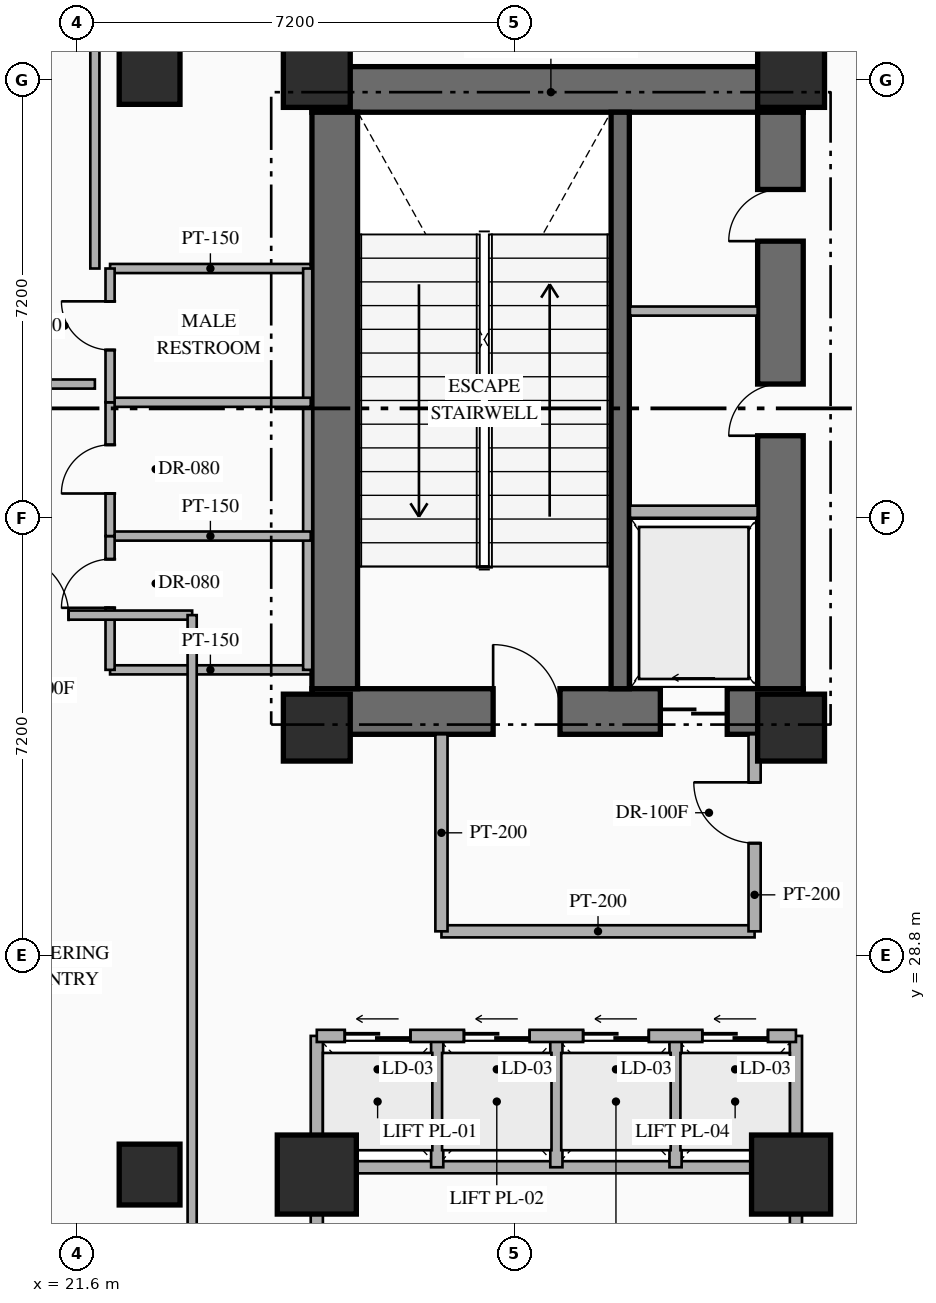
"""IFC4 building model, lengths in metres.
Left out: names, types, materials, properties, quantities, classifications, styles, units other than length and angle.
Written with IfcOpenShell. Run it as: python <this file> out.ifc"""

import sys

from ifc_helpers import new_model, si_unit, direction, frame, frame_2d, origin, origin_2d, place, context, subcontext, project, spatial, rectangle, hollow_rectangle, extrude, element, fill, save


model = new_model("IFC4")
c1 = context("Model", 3, precision=1e-05, world=origin(), true_north=direction((0.0, 1.0)))
c2 = subcontext(c1, "Body", "Model", "MODEL_VIEW")
j1 = project(units=[si_unit("LENGTHUNIT", "METRE"), si_unit("PLANEANGLEUNIT", "RADIAN")], contexts=[c1])
p1 = place(None, origin())
s1 = spatial("IfcSite", under=j1, at=p1, CompositionType="ELEMENT")
p2 = place(p1, origin())
s2 = spatial("IfcBuilding", under=s1, at=p2, CompositionType="ELEMENT")
p3 = place(p2, frame((0.0, 0.0, 21.6)))
s3 = spatial("IfcBuildingStorey", under=s2, at=p3, CompositionType="ELEMENT", Elevation=21.6)
p4 = place(p3, frame((25.47, 32.815, 0.0), z_axis=(0.0, 0.0, 1.0), x_axis=(1.0, 0.0, 0.0)))
e1 = element("IfcWall", 1, at=p4, inside=s3, PredefinedType="SHEAR", context=c2, shape_type="SweptSolid", body=[
    extrude(rectangle(XDim=8.08, YDim=0.75, at=frame_2d((4.04, 0.0))), origin(), (0.0, 0.0, 1.0), 5.4),
])
p5 = place(p4, frame((2.98, 0.0, 0.0)))
e2 = element("IfcOpeningElement", 2, at=p5, cuts=e1, PredefinedType="OPENING", context=c2, shape_type="SweptSolid", body=[
    extrude(rectangle(XDim=1.1, YDim=2.2, at=frame_2d((0.55, 1.1))), frame((0.0, 0.385, 0.0), z_axis=(0.0, -1.0, 0.0), x_axis=(1.0, 0.0, 0.0)), (0.0, 0.0, 1.0), 0.77),
])
p6 = place(p4, frame((5.73, 0.0, 0.0)))
e3 = element("IfcOpeningElement", 3, at=p6, cuts=e1, PredefinedType="OPENING", context=c2, shape_type="SweptSolid", body=[
    extrude(rectangle(XDim=1.1, YDim=2.15, at=frame_2d((0.55, 1.075))), frame((0.0, 0.385, 0.0), z_axis=(0.0, -1.0, 0.0), x_axis=(1.0, 0.0, 0.0)), (0.0, 0.0, 1.0), 0.77),
])
p7 = place(p3, frame((25.47, 43.045, 0.0), z_axis=(0.0, 0.0, 1.0), x_axis=(1.0, 0.0, 0.0)))
e4 = element("IfcWall", 4, at=p7, inside=s3, PredefinedType="SHEAR", context=c2, shape_type="SweptSolid", body=[
    extrude(rectangle(XDim=8.08, YDim=0.75, at=frame_2d((4.04, 0.0))), origin(), (0.0, 0.0, 1.0), 5.4),
])
p8 = place(p3, frame((25.845, 33.19, 0.0), z_axis=(0.0, 0.0, 1.0), x_axis=(0.0, 1.0, 0.0)))
e5 = element("IfcWall", 5, at=p8, inside=s3, PredefinedType="SHEAR", context=c2, shape_type="SweptSolid", body=[
    extrude(rectangle(XDim=9.48, YDim=0.75, at=frame_2d((4.74, 0.0))), origin(), (0.0, 0.0, 1.0), 5.4),
])
p9 = place(p3, frame((33.175, 33.19, 0.0), z_axis=(0.0, 0.0, 1.0), x_axis=(0.0, 1.0, 0.0)))
e6 = element("IfcWall", 6, at=p9, inside=s3, PredefinedType="SHEAR", context=c2, shape_type="SweptSolid", body=[
    extrude(rectangle(XDim=9.48, YDim=0.75, at=frame_2d((4.74, 0.0))), origin(), (0.0, 0.0, 1.0), 5.4),
])
p10 = place(p9, frame((4.16, 0.0, 0.0)))
e7 = element("IfcOpeningElement", 7, at=p10, cuts=e6, PredefinedType="OPENING", context=c2, shape_type="SweptSolid", body=[
    extrude(rectangle(XDim=0.85, YDim=2.08, at=frame_2d((0.425, 1.04))), frame((0.0, 0.385, 0.0), z_axis=(0.0, -1.0, 0.0), x_axis=(1.0, 0.0, 0.0)), (0.0, 0.0, 1.0), 0.77),
])
p11 = place(p9, frame((7.36, 0.0, 0.0)))
e8 = element("IfcOpeningElement", 8, at=p11, cuts=e6, PredefinedType="OPENING", context=c2, shape_type="SweptSolid", body=[
    extrude(rectangle(XDim=0.85, YDim=2.08, at=frame_2d((0.425, 1.04))), frame((0.0, 0.385, 0.0), z_axis=(0.0, -1.0, 0.0), x_axis=(1.0, 0.0, 0.0)), (0.0, 0.0, 1.0), 0.77),
])
p12 = place(p3, frame((30.54, 33.19, 0.0), z_axis=(0.0, 0.0, 1.0), x_axis=(0.0, 1.0, 0.0)))
e9 = element("IfcWall", 9, at=p12, inside=s3, PredefinedType="SHEAR", context=c2, shape_type="SweptSolid", body=[
    extrude(rectangle(XDim=9.48, YDim=0.3, at=frame_2d((4.74, 0.0))), origin(), (0.0, 0.0, 1.0), 5.4),
])
for number, where, z_axis, x_axis in (
    (10, (25.55, 32.55, 0.0), (0.0, 0.0, 1.0), (1.0, 0.0, 0.0)),
    (11, (33.35, 32.55, 0.0), (0.0, 0.0, 1.0), (1.0, 0.0, 0.0)),
    (12, (25.55, 43.3, 0.0), (0.0, 0.0, 1.0), (1.0, 0.0, 0.0)),
    (13, (33.35, 43.3, 0.0), (0.0, 0.0, 1.0), (1.0, 0.0, 0.0)),
):
    element("IfcColumn", number, at=place(p3, frame(where, z_axis=z_axis, x_axis=x_axis)), inside=s3, PredefinedType="COLUMN", context=c2, shape_type="SweptSolid", body=[
        extrude(rectangle(XDim=1.1, YDim=1.1, at=origin_2d()), origin(), (0.0, 0.0, 1.0), 5.4),
    ])
for number, where, z_axis, x_axis in (
    (14, (25.55, 25.2, 0.0), (0.0, 0.0, 1.0), (1.0, 0.0, 0.0)),
    (15, (33.35, 25.2, 0.0), (0.0, 0.0, 1.0), (1.0, 0.0, 0.0)),
):
    element("IfcColumn", number, at=place(p3, frame(where, z_axis=z_axis, x_axis=x_axis)), inside=s3, PredefinedType="COLUMN", context=c2, shape_type="SweptSolid", body=[
        extrude(rectangle(XDim=1.3, YDim=1.3, at=origin_2d()), origin(), (0.0, 0.0, 1.0), 5.4),
    ])
for number, where, z_axis, x_axis in (
    (16, (22.8, 25.2, 0.0), (0.0, 0.0, 1.0), (1.0, 0.0, 0.0)),
    (17, (22.8, 43.3, 0.0), (0.0, 0.0, 1.0), (1.0, 0.0, 0.0)),
):
    element("IfcColumn", number, at=place(p3, frame(where, z_axis=z_axis, x_axis=x_axis)), inside=s3, PredefinedType="COLUMN", context=c2, shape_type="SweptSolid", body=[
        extrude(hollow_rectangle(XDim=1.0, YDim=1.0, WallThickness=0.038, at=origin_2d()), origin(), (0.0, 0.0, 1.0), 5.4),
    ])
p13 = place(p3, frame((30.7, 36.1, 0.0), z_axis=(0.0, 0.0, 1.0), x_axis=(1.0, 0.0, 0.0)))
e18 = element("IfcWall", 18, at=p13, inside=s3, PredefinedType="STANDARD", context=c2, shape_type="SweptSolid", body=[
    extrude(rectangle(XDim=2.1, YDim=0.2, at=frame_2d((1.05, 0.0))), origin(), (0.0, 0.0, 1.0), 5.1),
])
p14 = place(p3, frame((30.7, 39.4, 0.0), z_axis=(0.0, 0.0, 1.0), x_axis=(1.0, 0.0, 0.0)))
e19 = element("IfcWall", 19, at=p14, inside=s3, PredefinedType="PARTITIONING", context=c2, shape_type="SweptSolid", body=[
    extrude(rectangle(XDim=2.1, YDim=0.15, at=frame_2d((1.05, 0.0))), origin(), (0.0, 0.0, 1.0), 5.1),
])
p15 = place(p3, frame((27.6, 29.2, 0.0), z_axis=(0.0, 0.0, 1.0), x_axis=(1.0, 0.0, 0.0)))
e20 = element("IfcWall", 20, at=p15, inside=s3, PredefinedType="STANDARD", context=c2, shape_type="SweptSolid", body=[
    extrude(rectangle(XDim=5.15, YDim=0.2, at=frame_2d((2.575, 0.0))), origin(), (0.0, 0.0, 1.0), 5.1),
])
p16 = place(p3, frame((27.6, 29.2, 0.0), z_axis=(0.0, 0.0, 1.0), x_axis=(0.0, 1.0, 0.0)))
e21 = element("IfcWall", 21, at=p16, inside=s3, PredefinedType="STANDARD", context=c2, shape_type="SweptSolid", body=[
    extrude(rectangle(XDim=3.24, YDim=0.2, at=frame_2d((1.62, 0.0))), origin(), (0.0, 0.0, 1.0), 5.1),
])
p17 = place(p3, frame((32.75, 29.2, 0.0), z_axis=(0.0, 0.0, 1.0), x_axis=(0.0, 1.0, 0.0)))
e22 = element("IfcWall", 22, at=p17, inside=s3, PredefinedType="STANDARD", context=c2, shape_type="SweptSolid", body=[
    extrude(rectangle(XDim=3.24, YDim=0.2, at=frame_2d((1.62, 0.0))), origin(), (0.0, 0.0, 1.0), 5.1),
])
p18 = place(p17, frame((1.45, 0.0, 0.0)))
e23 = element("IfcOpeningElement", 23, at=p18, cuts=e22, PredefinedType="OPENING", context=c2, shape_type="SweptSolid", body=[
    extrude(rectangle(XDim=1.0, YDim=2.2, at=frame_2d((0.5, 1.1))), frame((0.0, 0.11, 0.0), z_axis=(0.0, -1.0, 0.0), x_axis=(1.0, 0.0, 0.0)), (0.0, 0.0, 1.0), 0.22),
])
for number, where, z_axis, x_axis in (
    (24, (25.55, 23.4, 0.0), (0.0, 0.0, 1.0), (0.0, 1.0, 0.0)),
    (25, (33.43, 23.4, 0.0), (0.0, 0.0, 1.0), (0.0, 1.0, 0.0)),
):
    element("IfcWall", number, at=place(p3, frame(where, z_axis=z_axis, x_axis=x_axis)), inside=s3, PredefinedType="STANDARD", context=c2, shape_type="SweptSolid", body=[
        extrude(rectangle(XDim=4.08, YDim=0.2, at=frame_2d((2.04, 0.0))), origin(), (0.0, 0.0, 1.0), 3.895),
    ])
p19 = place(p3, frame((25.55, 25.32, 0.0), z_axis=(0.0, 0.0, 1.0), x_axis=(1.0, 0.0, 0.0)))
e26 = element("IfcWall", 26, at=p19, inside=s3, PredefinedType="STANDARD", context=c2, shape_type="SweptSolid", body=[
    extrude(rectangle(XDim=7.88, YDim=0.2, at=frame_2d((3.94, 0.0))), origin(), (0.0, 0.0, 1.0), 4.495),
])
for number, where, z_axis, x_axis in (
    (27, (27.53, 25.32, 0.0), (0.0, 0.0, 1.0), (0.0, 1.0, 0.0)),
    (28, (29.49, 25.32, 0.0), (0.0, 0.0, 1.0), (0.0, 1.0, 0.0)),
    (29, (31.45, 25.32, 0.0), (0.0, 0.0, 1.0), (0.0, 1.0, 0.0)),
):
    element("IfcWall", number, at=place(p3, frame(where, z_axis=z_axis, x_axis=x_axis)), inside=s3, PredefinedType="STANDARD", context=c2, shape_type="SweptSolid", body=[
        extrude(rectangle(XDim=2.16, YDim=0.2, at=frame_2d((1.08, 0.0))), origin(), (0.0, 0.0, 1.0), 5.1),
    ])
p20 = place(p3, frame((25.55, 27.48, 0.0), z_axis=(0.0, 0.0, 1.0), x_axis=(1.0, 0.0, 0.0)))
e30 = element("IfcWall", 30, at=p20, inside=s3, PredefinedType="STANDARD", context=c2, shape_type="SweptSolid", body=[
    extrude(rectangle(XDim=7.88, YDim=0.2, at=frame_2d((3.94, 0.0))), origin(), (0.0, 0.0, 1.0), 5.1),
])
p21 = place(p20, frame((0.46, 0.0, 0.0)))
e31 = element("IfcOpeningElement", 31, at=p21, cuts=e30, PredefinedType="OPENING", context=c2, shape_type="SweptSolid", body=[
    extrude(rectangle(XDim=1.08, YDim=2.15, at=frame_2d((0.54, 1.075))), frame((0.0, 0.11, 0.0), z_axis=(0.0, -1.0, 0.0), x_axis=(1.0, 0.0, 0.0)), (0.0, 0.0, 1.0), 0.22),
])
p22 = place(p20, frame((2.42, 0.0, 0.0)))
e32 = element("IfcOpeningElement", 32, at=p22, cuts=e30, PredefinedType="OPENING", context=c2, shape_type="SweptSolid", body=[
    extrude(rectangle(XDim=1.08, YDim=2.15, at=frame_2d((0.54, 1.075))), frame((0.0, 0.11, 0.0), z_axis=(0.0, -1.0, 0.0), x_axis=(1.0, 0.0, 0.0)), (0.0, 0.0, 1.0), 0.22),
])
p23 = place(p20, frame((4.38, 0.0, 0.0)))
e33 = element("IfcOpeningElement", 33, at=p23, cuts=e30, PredefinedType="OPENING", context=c2, shape_type="SweptSolid", body=[
    extrude(rectangle(XDim=1.08, YDim=2.15, at=frame_2d((0.54, 1.075))), frame((0.0, 0.11, 0.0), z_axis=(0.0, -1.0, 0.0), x_axis=(1.0, 0.0, 0.0)), (0.0, 0.0, 1.0), 0.22),
])
p24 = place(p20, frame((6.34, 0.0, 0.0)))
e34 = element("IfcOpeningElement", 34, at=p24, cuts=e30, PredefinedType="OPENING", context=c2, shape_type="SweptSolid", body=[
    extrude(rectangle(XDim=1.08, YDim=2.15, at=frame_2d((0.54, 1.075))), frame((0.0, 0.11, 0.0), z_axis=(0.0, -1.0, 0.0), x_axis=(1.0, 0.0, 0.0)), (0.0, 0.0, 1.0), 0.22),
])
for number, where, z_axis, x_axis in (
    (35, (22.15, 33.5, 0.0), (0.0, 0.0, 1.0), (1.0, 0.0, 0.0)),
    (36, (22.15, 40.1, 0.0), (0.0, 0.0, 1.0), (1.0, 0.0, 0.0)),
):
    element("IfcWall", number, at=place(p3, frame(where, z_axis=z_axis, x_axis=x_axis)), inside=s3, PredefinedType="PARTITIONING", context=c2, shape_type="SweptSolid", body=[
        extrude(rectangle(XDim=3.3, YDim=0.15, at=frame_2d((1.65, 0.0))), origin(), (0.0, 0.0, 1.0), 5.1),
    ])
p25 = place(p3, frame((25.4, 33.5, 0.0), z_axis=(0.0, 0.0, 1.0), x_axis=(0.0, 1.0, 0.0)))
e37 = element("IfcWall", 37, at=p25, inside=s3, PredefinedType="PARTITIONING", context=c2, shape_type="SweptSolid", body=[
    extrude(rectangle(XDim=6.6, YDim=0.15, at=frame_2d((3.3, 0.0))), origin(), (0.0, 0.0, 1.0), 5.1),
])
for number, where, z_axis, x_axis in (
    (38, (22.15, 35.7, 0.0), (0.0, 0.0, 1.0), (1.0, 0.0, 0.0)),
    (39, (22.15, 37.9, 0.0), (0.0, 0.0, 1.0), (1.0, 0.0, 0.0)),
):
    element("IfcWall", number, at=place(p3, frame(where, z_axis=z_axis, x_axis=x_axis)), inside=s3, PredefinedType="PARTITIONING", context=c2, shape_type="SweptSolid", body=[
        extrude(rectangle(XDim=3.3, YDim=0.15, at=frame_2d((1.65, 0.0))), origin(), (0.0, 0.0, 1.0), 5.1),
    ])
p26 = place(p3, frame((22.15, 33.5, 0.0), z_axis=(0.0, 0.0, 1.0), x_axis=(0.0, 1.0, 0.0)))
e40 = element("IfcWall", 40, at=p26, inside=s3, PredefinedType="PARTITIONING", context=c2, shape_type="SweptSolid", body=[
    extrude(rectangle(XDim=2.2, YDim=0.15, at=frame_2d((1.1, 0.0))), origin(), (0.0, 0.0, 1.0), 5.1),
])
p27 = place(p26, frame((1.02, 0.0, 0.0)))
e41 = element("IfcOpeningElement", 41, at=p27, cuts=e40, PredefinedType="OPENING", context=c2, shape_type="SweptSolid", body=[
    extrude(rectangle(XDim=0.8, YDim=2.06, at=frame_2d((0.4, 1.03))), frame((0.0, 0.085, 0.0), z_axis=(0.0, -1.0, 0.0), x_axis=(1.0, 0.0, 0.0)), (0.0, 0.0, 1.0), 0.17),
])
p28 = place(p3, frame((22.15, 35.7, 0.0), z_axis=(0.0, 0.0, 1.0), x_axis=(0.0, 1.0, 0.0)))
e42 = element("IfcWall", 42, at=p28, inside=s3, PredefinedType="PARTITIONING", context=c2, shape_type="SweptSolid", body=[
    extrude(rectangle(XDim=2.2, YDim=0.15, at=frame_2d((1.1, 0.0))), origin(), (0.0, 0.0, 1.0), 5.1),
])
p29 = place(p28, frame((0.7, 0.0, 0.0)))
e43 = element("IfcOpeningElement", 43, at=p29, cuts=e42, PredefinedType="OPENING", context=c2, shape_type="SweptSolid", body=[
    extrude(rectangle(XDim=0.8, YDim=2.06, at=frame_2d((0.4, 1.03))), frame((0.0, 0.085, 0.0), z_axis=(0.0, -1.0, 0.0), x_axis=(1.0, 0.0, 0.0)), (0.0, 0.0, 1.0), 0.17),
])
p30 = place(p3, frame((22.15, 37.9, 0.0), z_axis=(0.0, 0.0, 1.0), x_axis=(0.0, 1.0, 0.0)))
e44 = element("IfcWall", 44, at=p30, inside=s3, PredefinedType="PARTITIONING", context=c2, shape_type="SweptSolid", body=[
    extrude(rectangle(XDim=2.2, YDim=0.15, at=frame_2d((1.1, 0.0))), origin(), (0.0, 0.0, 1.0), 5.1),
])
p31 = place(p30, frame((0.86, 0.0, 0.0)))
e45 = element("IfcOpeningElement", 45, at=p31, cuts=e44, PredefinedType="OPENING", context=c2, shape_type="SweptSolid", body=[
    extrude(rectangle(XDim=0.8, YDim=2.06, at=frame_2d((0.4, 1.03))), frame((0.0, 0.085, 0.0), z_axis=(0.0, -1.0, 0.0), x_axis=(1.0, 0.0, 0.0)), (0.0, 0.0, 1.0), 0.17),
])
p32 = place(p3, frame((17.2, 38.2, 0.0), z_axis=(0.0, 0.0, 1.0), x_axis=(1.0, 0.0, 0.0)))
e46 = element("IfcWall", 46, at=p32, inside=s3, PredefinedType="PARTITIONING", context=c2, shape_type="SweptSolid", body=[
    extrude(rectangle(XDim=4.7, YDim=0.15, at=frame_2d((2.35, 0.0))), origin(), (0.0, 0.0, 1.0), 5.1),
])
p33 = place(p32, frame((1.875, 0.0, 0.0)))
e47 = element("IfcOpeningElement", 47, at=p33, cuts=e46, PredefinedType="OPENING", context=c2, shape_type="SweptSolid", body=[
    extrude(rectangle(XDim=0.95, YDim=2.15, at=frame_2d((0.475, 1.075))), frame((0.0, 0.085, 0.0), z_axis=(0.0, -1.0, 0.0), x_axis=(1.0, 0.0, 0.0)), (0.0, 0.0, 1.0), 0.17),
])
p34 = place(p3, frame((21.9, 40.1, 0.0), z_axis=(0.0, 0.0, 1.0), x_axis=(0.0, 1.0, 0.0)))
e48 = element("IfcWall", 48, at=p34, inside=s3, PredefinedType="PARTITIONING", context=c2, shape_type="SweptSolid", body=[
    extrude(rectangle(XDim=11.46, YDim=0.15, at=frame_2d((5.73, 0.0))), origin(), (0.0, 0.0, 1.0), 5.1),
])
p35 = place(p3, frame((19.2, 34.4, 0.0), z_axis=(0.0, 0.0, 1.0), x_axis=(1.0, 0.0, 0.0)))
e49 = element("IfcWall", 49, at=p35, inside=s3, PredefinedType="PARTITIONING", context=c2, shape_type="SweptSolid", body=[
    extrude(rectangle(XDim=4.3, YDim=0.15, at=frame_2d((2.15, 0.0))), origin(), (0.0, 0.0, 1.0), 5.1),
])
p36 = place(p35, frame((1.269, 0.0, 0.0)))
e50 = element("IfcOpeningElement", 50, at=p36, cuts=e49, PredefinedType="OPENING", context=c2, shape_type="SweptSolid", body=[
    extrude(rectangle(XDim=1.0, YDim=2.2, at=frame_2d((0.5, 1.1))), frame((0.0, 0.085, 0.0), z_axis=(0.0, -1.0, 0.0), x_axis=(1.0, 0.0, 0.0)), (0.0, 0.0, 1.0), 0.17),
])
p37 = place(p3, frame((23.5, 23.44, 0.0), z_axis=(0.0, 0.0, 1.0), x_axis=(0.0, 1.0, 0.0)))
e51 = element("IfcWall", 51, at=p37, inside=s3, PredefinedType="PARTITIONING", context=c2, shape_type="SweptSolid", body=[
    extrude(rectangle(XDim=10.96, YDim=0.15, at=frame_2d((5.48, 0.0))), origin(), (0.0, 0.0, 1.0), 5.1),
])
p38 = place(p3, frame((33.384, 17.312, 0.0), z_axis=(0.0, 0.0, 1.0), x_axis=(0.600008743659, 0.799993442181, 0.0)))
e52 = element("IfcWall", 52, at=p38, inside=s3, PredefinedType="PARTITIONING", context=c2, shape_type="SweptSolid", body=[
    extrude(rectangle(XDim=8.935, YDim=0.15, at=frame_2d((4.468, 0.0))), origin(), (0.0, 0.0, 1.0), 5.1),
])
p39 = place(p5, origin())
e53 = element("IfcDoor", 53, at=p39, inside=s3, OperationType="SINGLE_SWING_LEFT", PredefinedType="DOOR", context=c2, shape_type="SweptSolid", body=[
    extrude(rectangle(XDim=1.1, YDim=2.2, at=frame_2d((0.55, 1.1))), frame((0.0, 0.025, 0.0), z_axis=(0.0, -1.0, 0.0), x_axis=(1.0, 0.0, 0.0)), (0.0, 0.0, 1.0), 0.05),
])
fill(e2, e53)
p40 = place(p6, origin())
e54 = element("IfcDoor", 54, at=p40, inside=s3, OperationType="SLIDING_TO_LEFT", PredefinedType="USERDEFINED", context=c2, shape_type="SweptSolid", body=[
    extrude(rectangle(XDim=1.1, YDim=2.15, at=frame_2d((0.55, 1.075))), frame((0.0, 0.025, 0.0), z_axis=(0.0, -1.0, 0.0), x_axis=(1.0, 0.0, 0.0)), (0.0, 0.0, 1.0), 0.05),
])
fill(e3, e54)
p41 = place(p10, origin())
e55 = element("IfcDoor", 55, at=p41, inside=s3, OperationType="SINGLE_SWING_LEFT", PredefinedType="DOOR", context=c2, shape_type="SweptSolid", body=[
    extrude(rectangle(XDim=0.85, YDim=2.08, at=frame_2d((0.425, 1.04))), frame((0.0, 0.025, 0.0), z_axis=(0.0, -1.0, 0.0), x_axis=(1.0, 0.0, 0.0)), (0.0, 0.0, 1.0), 0.05),
])
fill(e7, e55)
p42 = place(p11, origin())
e56 = element("IfcDoor", 56, at=p42, inside=s3, OperationType="SINGLE_SWING_LEFT", PredefinedType="DOOR", context=c2, shape_type="SweptSolid", body=[
    extrude(rectangle(XDim=0.85, YDim=2.08, at=frame_2d((0.425, 1.04))), frame((0.0, 0.025, 0.0), z_axis=(0.0, -1.0, 0.0), x_axis=(1.0, 0.0, 0.0)), (0.0, 0.0, 1.0), 0.05),
])
fill(e8, e56)
p43 = place(p18, origin())
e57 = element("IfcDoor", 57, at=p43, inside=s3, OperationType="SINGLE_SWING_RIGHT", PredefinedType="DOOR", context=c2, shape_type="SweptSolid", body=[
    extrude(rectangle(XDim=1.0, YDim=2.2, at=frame_2d((0.5, 1.1))), frame((0.0, 0.025, 0.0), z_axis=(0.0, -1.0, 0.0), x_axis=(1.0, 0.0, 0.0)), (0.0, 0.0, 1.0), 0.05),
])
fill(e23, e57)
p44 = place(p21, origin())
e58 = element("IfcDoor", 58, at=p44, inside=s3, OperationType="SLIDING_TO_LEFT", PredefinedType="USERDEFINED", context=c2, shape_type="SweptSolid", body=[
    extrude(rectangle(XDim=1.08, YDim=2.15, at=frame_2d((0.54, 1.075))), frame((0.0, 0.025, 0.0), z_axis=(0.0, -1.0, 0.0), x_axis=(1.0, 0.0, 0.0)), (0.0, 0.0, 1.0), 0.05),
])
fill(e31, e58)
p45 = place(p22, origin())
e59 = element("IfcDoor", 59, at=p45, inside=s3, OperationType="SLIDING_TO_LEFT", PredefinedType="USERDEFINED", context=c2, shape_type="SweptSolid", body=[
    extrude(rectangle(XDim=1.08, YDim=2.15, at=frame_2d((0.54, 1.075))), frame((0.0, 0.025, 0.0), z_axis=(0.0, -1.0, 0.0), x_axis=(1.0, 0.0, 0.0)), (0.0, 0.0, 1.0), 0.05),
])
fill(e32, e59)
p46 = place(p23, origin())
e60 = element("IfcDoor", 60, at=p46, inside=s3, OperationType="SLIDING_TO_LEFT", PredefinedType="USERDEFINED", context=c2, shape_type="SweptSolid", body=[
    extrude(rectangle(XDim=1.08, YDim=2.15, at=frame_2d((0.54, 1.075))), frame((0.0, 0.025, 0.0), z_axis=(0.0, -1.0, 0.0), x_axis=(1.0, 0.0, 0.0)), (0.0, 0.0, 1.0), 0.05),
])
fill(e33, e60)
p47 = place(p24, origin())
e61 = element("IfcDoor", 61, at=p47, inside=s3, OperationType="SLIDING_TO_LEFT", PredefinedType="USERDEFINED", context=c2, shape_type="SweptSolid", body=[
    extrude(rectangle(XDim=1.08, YDim=2.15, at=frame_2d((0.54, 1.075))), frame((0.0, 0.025, 0.0), z_axis=(0.0, -1.0, 0.0), x_axis=(1.0, 0.0, 0.0)), (0.0, 0.0, 1.0), 0.05),
])
fill(e34, e61)
p48 = place(p27, origin())
e62 = element("IfcDoor", 62, at=p48, inside=s3, OperationType="SINGLE_SWING_LEFT", PredefinedType="DOOR", context=c2, shape_type="SweptSolid", body=[
    extrude(rectangle(XDim=0.8, YDim=2.06, at=frame_2d((0.4, 1.03))), frame((0.0, 0.025, 0.0), z_axis=(0.0, -1.0, 0.0), x_axis=(1.0, 0.0, 0.0)), (0.0, 0.0, 1.0), 0.05),
])
fill(e41, e62)
p49 = place(p29, origin())
e63 = element("IfcDoor", 63, at=p49, inside=s3, OperationType="SINGLE_SWING_LEFT", PredefinedType="DOOR", context=c2, shape_type="SweptSolid", body=[
    extrude(rectangle(XDim=0.8, YDim=2.06, at=frame_2d((0.4, 1.03))), frame((0.0, 0.025, 0.0), z_axis=(0.0, -1.0, 0.0), x_axis=(1.0, 0.0, 0.0)), (0.0, 0.0, 1.0), 0.05),
])
fill(e43, e63)
p50 = place(p31, origin())
e64 = element("IfcDoor", 64, at=p50, inside=s3, OperationType="SINGLE_SWING_RIGHT", PredefinedType="DOOR", context=c2, shape_type="SweptSolid", body=[
    extrude(rectangle(XDim=0.8, YDim=2.06, at=frame_2d((0.4, 1.03))), frame((0.0, 0.025, 0.0), z_axis=(0.0, -1.0, 0.0), x_axis=(1.0, 0.0, 0.0)), (0.0, 0.0, 1.0), 0.05),
])
fill(e45, e64)
p51 = place(p36, origin())
e65 = element("IfcDoor", 65, at=p51, inside=s3, OperationType="SINGLE_SWING_LEFT", PredefinedType="DOOR", context=c2, shape_type="SweptSolid", body=[
    extrude(rectangle(XDim=1.0, YDim=2.2, at=frame_2d((0.5, 1.1))), frame((0.0, 0.025, 0.0), z_axis=(0.0, -1.0, 0.0), x_axis=(1.0, 0.0, 0.0)), (0.0, 0.0, 1.0), 0.05),
])
fill(e50, e65)
save(model, sys.argv[1])
